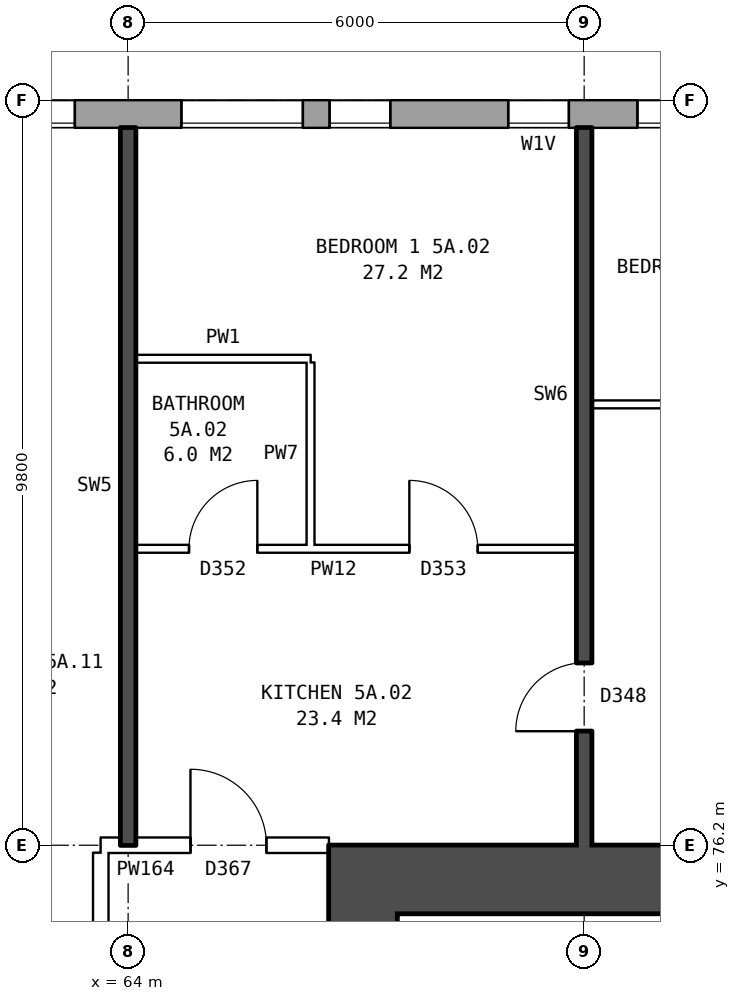
"""IFC4 building model, lengths in metres.
Left out: names, types, materials, properties, quantities, classifications, styles, units other than length and angle.
Written with IfcOpenShell. Run it as: python <this file> out.ifc"""

import sys

from ifc_helpers import new_model, si_unit, direction, frame, frame_2d, origin, place, context, subcontext, project, spatial, rectangle, extrude, element, fill, save


model = new_model("IFC4")
c1 = context("Model", 3, precision=1e-05, world=origin(), true_north=direction((0.0, 1.0)))
c2 = subcontext(c1, "Body", "Model", "MODEL_VIEW")
j1 = project(units=[si_unit("LENGTHUNIT", "METRE"), si_unit("PLANEANGLEUNIT", "RADIAN")], contexts=[c1])
p1 = place(None, origin())
s1 = spatial("IfcSite", under=j1, at=p1, CompositionType="ELEMENT")
p2 = place(p1, origin())
s2 = spatial("IfcBuilding", under=s1, at=p2, CompositionType="ELEMENT")
p3 = place(p2, frame((0.0, 0.0, 22.6)))
s3 = spatial("IfcBuildingStorey", under=s2, at=p3, CompositionType="ELEMENT", Elevation=22.6)
p4 = place(p3, frame((72.925, 85.82, 0.0), z_axis=(0.0, 0.0, 1.0), x_axis=(-1.0, 0.0, 0.0)))
e1 = element("IfcWall", 1, at=p4, inside=s3, PredefinedType="STANDARD", context=c2, shape_type="SweptSolid", body=[
    extrude(rectangle(XDim=50.101, YDim=0.36, at=frame_2d((25.05, 0.0))), origin(), (0.0, 0.0, 1.0), 2.85),
])
p5 = place(p4, frame((0.625, 0.0, 0.8)))
e2 = element("IfcOpeningElement", 2, at=p5, cuts=e1, PredefinedType="OPENING", context=c2, shape_type="SweptSolid", body=[
    extrude(rectangle(XDim=1.6, YDim=1.8, at=frame_2d((0.8, 0.9))), frame((0.0, 0.19, 0.0), z_axis=(0.0, -1.0, 0.0), x_axis=(1.0, 0.0, 0.0)), (0.0, 0.0, 1.0), 0.38),
])
p6 = place(p4, frame((3.125, 0.0, 1.7)))
e3 = element("IfcOpeningElement", 3, at=p6, cuts=e1, PredefinedType="OPENING", context=c2, shape_type="SweptSolid", body=[
    extrude(rectangle(XDim=0.8, YDim=0.9, at=frame_2d((0.4, 0.45))), frame((0.0, 0.19, 0.0), z_axis=(0.0, -1.0, 0.0), x_axis=(1.0, 0.0, 0.0)), (0.0, 0.0, 1.0), 0.38),
])
p7 = place(p4, frame((6.625, 0.0, 0.8)))
e4 = element("IfcOpeningElement", 4, at=p7, cuts=e1, PredefinedType="OPENING", context=c2, shape_type="SweptSolid", body=[
    extrude(rectangle(XDim=1.6, YDim=1.8, at=frame_2d((0.8, 0.9))), frame((0.0, 0.19, 0.0), z_axis=(0.0, -1.0, 0.0), x_axis=(1.0, 0.0, 0.0)), (0.0, 0.0, 1.0), 0.38),
])
p8 = place(p4, frame((9.625, 0.0, 0.8)))
e5 = element("IfcOpeningElement", 5, at=p8, cuts=e1, PredefinedType="OPENING", context=c2, shape_type="SweptSolid", body=[
    extrude(rectangle(XDim=1.6, YDim=1.8, at=frame_2d((0.8, 0.9))), frame((0.0, 0.19, 0.0), z_axis=(0.0, -1.0, 0.0), x_axis=(1.0, 0.0, 0.0)), (0.0, 0.0, 1.0), 0.38),
])
p9 = place(p4, frame((12.625, 0.0, 0.8)))
e6 = element("IfcOpeningElement", 6, at=p9, cuts=e1, PredefinedType="OPENING", context=c2, shape_type="SweptSolid", body=[
    extrude(rectangle(XDim=1.6, YDim=1.8, at=frame_2d((0.8, 0.9))), frame((0.0, 0.19, 0.0), z_axis=(0.0, -1.0, 0.0), x_axis=(1.0, 0.0, 0.0)), (0.0, 0.0, 1.0), 0.38),
])
p10 = place(p4, frame((15.625, 0.0, 0.8)))
e7 = element("IfcOpeningElement", 7, at=p10, cuts=e1, PredefinedType="OPENING", context=c2, shape_type="SweptSolid", body=[
    extrude(rectangle(XDim=1.6, YDim=1.8, at=frame_2d((0.8, 0.9))), frame((0.0, 0.19, 0.0), z_axis=(0.0, -1.0, 0.0), x_axis=(1.0, 0.0, 0.0)), (0.0, 0.0, 1.0), 0.38),
])
p11 = place(p4, frame((18.625, 0.0, 0.8)))
e8 = element("IfcOpeningElement", 8, at=p11, cuts=e1, PredefinedType="OPENING", context=c2, shape_type="SweptSolid", body=[
    extrude(rectangle(XDim=1.6, YDim=1.8, at=frame_2d((0.8, 0.9))), frame((0.0, 0.19, 0.0), z_axis=(0.0, -1.0, 0.0), x_axis=(1.0, 0.0, 0.0)), (0.0, 0.0, 1.0), 0.38),
])
p12 = place(p4, frame((21.625, 0.0, 0.8)))
e9 = element("IfcOpeningElement", 9, at=p12, cuts=e1, PredefinedType="OPENING", context=c2, shape_type="SweptSolid", body=[
    extrude(rectangle(XDim=1.6, YDim=1.8, at=frame_2d((0.8, 0.9))), frame((0.0, 0.19, 0.0), z_axis=(0.0, -1.0, 0.0), x_axis=(1.0, 0.0, 0.0)), (0.0, 0.0, 1.0), 0.38),
])
p13 = place(p4, frame((24.625, 0.0, 0.8)))
e10 = element("IfcOpeningElement", 10, at=p13, cuts=e1, PredefinedType="OPENING", context=c2, shape_type="SweptSolid", body=[
    extrude(rectangle(XDim=1.6, YDim=1.8, at=frame_2d((0.8, 0.9))), frame((0.0, 0.19, 0.0), z_axis=(0.0, -1.0, 0.0), x_axis=(1.0, 0.0, 0.0)), (0.0, 0.0, 1.0), 0.38),
])
p14 = place(p4, frame((27.625, 0.0, 0.8)))
e11 = element("IfcOpeningElement", 11, at=p14, cuts=e1, PredefinedType="OPENING", context=c2, shape_type="SweptSolid", body=[
    extrude(rectangle(XDim=1.6, YDim=1.8, at=frame_2d((0.8, 0.9))), frame((0.0, 0.19, 0.0), z_axis=(0.0, -1.0, 0.0), x_axis=(1.0, 0.0, 0.0)), (0.0, 0.0, 1.0), 0.38),
])
p15 = place(p4, frame((30.625, 0.0, 0.8)))
e12 = element("IfcOpeningElement", 12, at=p15, cuts=e1, PredefinedType="OPENING", context=c2, shape_type="SweptSolid", body=[
    extrude(rectangle(XDim=1.6, YDim=1.8, at=frame_2d((0.8, 0.9))), frame((0.0, 0.19, 0.0), z_axis=(0.0, -1.0, 0.0), x_axis=(1.0, 0.0, 0.0)), (0.0, 0.0, 1.0), 0.38),
])
p16 = place(p4, frame((33.625, 0.0, 0.8)))
e13 = element("IfcOpeningElement", 13, at=p16, cuts=e1, PredefinedType="OPENING", context=c2, shape_type="SweptSolid", body=[
    extrude(rectangle(XDim=1.6, YDim=1.8, at=frame_2d((0.8, 0.9))), frame((0.0, 0.19, 0.0), z_axis=(0.0, -1.0, 0.0), x_axis=(1.0, 0.0, 0.0)), (0.0, 0.0, 1.0), 0.38),
])
p17 = place(p4, frame((36.625, 0.0, 0.8)))
e14 = element("IfcOpeningElement", 14, at=p17, cuts=e1, PredefinedType="OPENING", context=c2, shape_type="SweptSolid", body=[
    extrude(rectangle(XDim=1.6, YDim=1.8, at=frame_2d((0.8, 0.9))), frame((0.0, 0.19, 0.0), z_axis=(0.0, -1.0, 0.0), x_axis=(1.0, 0.0, 0.0)), (0.0, 0.0, 1.0), 0.38),
])
p18 = place(p4, frame((39.625, 0.0, 0.8)))
e15 = element("IfcOpeningElement", 15, at=p18, cuts=e1, PredefinedType="OPENING", context=c2, shape_type="SweptSolid", body=[
    extrude(rectangle(XDim=1.6, YDim=1.8, at=frame_2d((0.8, 0.9))), frame((0.0, 0.19, 0.0), z_axis=(0.0, -1.0, 0.0), x_axis=(1.0, 0.0, 0.0)), (0.0, 0.0, 1.0), 0.38),
])
p19 = place(p4, frame((41.525, 0.0, 0.8)))
e16 = element("IfcOpeningElement", 16, at=p19, cuts=e1, PredefinedType="OPENING", context=c2, shape_type="SweptSolid", body=[
    extrude(rectangle(XDim=1.6, YDim=1.8, at=frame_2d((0.8, 0.9))), frame((0.0, 0.19, 0.0), z_axis=(0.0, -1.0, 0.0), x_axis=(1.0, 0.0, 0.0)), (0.0, 0.0, 1.0), 0.38),
])
p20 = place(p4, frame((46.525, 0.0, 1.4)))
e17 = element("IfcOpeningElement", 17, at=p20, cuts=e1, PredefinedType="OPENING", context=c2, shape_type="SweptSolid", body=[
    extrude(rectangle(XDim=1.0, YDim=1.2, at=frame_2d((0.5, 0.6))), frame((0.0, 0.19, 0.0), z_axis=(0.0, -1.0, 0.0), x_axis=(1.0, 0.0, 0.0)), (0.0, 0.0, 1.0), 0.38),
])
p21 = place(p4, frame((5.475, 0.0, 0.8)))
e18 = element("IfcOpeningElement", 18, at=p21, cuts=e1, PredefinedType="OPENING", context=c2, shape_type="SweptSolid", body=[
    extrude(rectangle(XDim=0.8, YDim=0.9, at=frame_2d((0.4, 0.45))), frame((0.0, 0.19, 0.0), z_axis=(0.0, -1.0, 0.0), x_axis=(1.0, 0.0, 0.0)), (0.0, 0.0, 1.0), 0.38),
])
p22 = place(p4, frame((43.425, 0.0, 0.8)))
e19 = element("IfcOpeningElement", 19, at=p22, cuts=e1, PredefinedType="OPENING", context=c2, shape_type="SweptSolid", body=[
    extrude(rectangle(XDim=0.6, YDim=1.2, at=frame_2d((0.3, 0.6))), frame((0.0, 0.19, 0.0), z_axis=(0.0, -1.0, 0.0), x_axis=(1.0, 0.0, 0.0)), (0.0, 0.0, 1.0), 0.38),
])
p23 = place(p4, frame((47.825, 0.0, 0.8)))
e20 = element("IfcOpeningElement", 20, at=p23, cuts=e1, PredefinedType="OPENING", context=c2, shape_type="SweptSolid", body=[
    extrude(rectangle(XDim=1.4, YDim=1.8, at=frame_2d((0.7, 0.9))), frame((0.0, 0.19, 0.0), z_axis=(0.0, -1.0, 0.0), x_axis=(1.0, 0.0, 0.0)), (0.0, 0.0, 1.0), 0.38),
])
p24 = place(p3, frame((67.09, 64.7, 0.0), z_axis=(0.0, 0.0, 1.0), x_axis=(0.0, 1.0, 0.0)))
e21 = element("IfcWall", 21, at=p24, inside=s3, PredefinedType="SHEAR", context=c2, shape_type="SweptSolid", body=[
    extrude(rectangle(XDim=10.6, YDim=0.9, at=frame_2d((5.3, 0.0))), origin(), (0.0, 0.0, 1.0), 2.85),
])
p25 = place(p24, frame((0.425, 0.0, 0.0)))
e22 = element("IfcOpeningElement", 22, at=p25, cuts=e21, PredefinedType="OPENING", context=c2, shape_type="SweptSolid", body=[
    extrude(rectangle(XDim=1.1, YDim=2.1, at=frame_2d((0.55, 1.05))), frame((0.0, 0.46, 0.0), z_axis=(0.0, -1.0, 0.0), x_axis=(1.0, 0.0, 0.0)), (0.0, 0.0, 1.0), 0.92),
])
p26 = place(p24, frame((9.0, 0.0, 0.0)))
e23 = element("IfcOpeningElement", 23, at=p26, cuts=e21, PredefinedType="OPENING", context=c2, shape_type="SweptSolid", body=[
    extrude(rectangle(XDim=1.1, YDim=2.1, at=frame_2d((0.55, 1.05))), frame((0.0, 0.46, 0.0), z_axis=(0.0, -1.0, 0.0), x_axis=(1.0, 0.0, 0.0)), (0.0, 0.0, 1.0), 0.92),
])
p27 = place(p3, frame((66.64, 75.75, 0.0), z_axis=(0.0, 0.0, 1.0), x_axis=(1.0, 0.0, 0.0)))
e24 = element("IfcWall", 24, at=p27, inside=s3, PredefinedType="SHEAR", context=c2, shape_type="SweptSolid", body=[
    extrude(rectangle(XDim=9.0, YDim=0.9, at=frame_2d((4.5, 0.0))), origin(), (0.0, 0.0, 1.0), 2.85),
])
p28 = place(p3, frame((63.64, 63.9, 0.0), z_axis=(0.0, 0.0, 1.0), x_axis=(0.0, 1.0, 0.0)))
e25 = element("IfcWall", 25, at=p28, inside=s3, PredefinedType="PARTITIONING", context=c2, shape_type="SweptSolid", body=[
    extrude(rectangle(XDim=12.2, YDim=0.2, at=frame_2d((6.1, 0.0))), origin(), (0.0, 0.0, 1.0), 2.85),
])
p29 = place(p28, frame((5.1, 0.0, 0.0)))
e26 = element("IfcOpeningElement", 26, at=p29, cuts=e25, PredefinedType="OPENING", context=c2, shape_type="SweptSolid", body=[
    extrude(rectangle(XDim=2.0, YDim=2.1, at=frame_2d((1.0, 1.05))), frame((0.0, 0.11, 0.0), z_axis=(0.0, -1.0, 0.0), x_axis=(1.0, 0.0, 0.0)), (0.0, 0.0, 1.0), 0.22),
])
p30 = place(p3, frame((63.64, 76.2, 0.0), z_axis=(0.0, 0.0, 1.0), x_axis=(1.0, 0.0, 0.0)))
e27 = element("IfcWall", 27, at=p30, inside=s3, PredefinedType="PARTITIONING", context=c2, shape_type="SweptSolid", body=[
    extrude(rectangle(XDim=3.0, YDim=0.2, at=frame_2d((1.5, 0.0))), origin(), (0.0, 0.0, 1.0), 2.85),
])
p31 = place(p30, frame((1.18, 0.0, 0.0)))
e28 = element("IfcOpeningElement", 28, at=p31, cuts=e27, PredefinedType="OPENING", context=c2, shape_type="SweptSolid", body=[
    extrude(rectangle(XDim=1.0, YDim=2.1, at=frame_2d((0.5, 1.05))), frame((0.0, 0.11, 0.0), z_axis=(0.0, -1.0, 0.0), x_axis=(1.0, 0.0, 0.0)), (0.0, 0.0, 1.0), 0.22),
])
p32 = place(p3, frame((64.1, 80.1, 0.0), z_axis=(0.0, 0.0, 1.0), x_axis=(1.0, 0.0, 0.0)))
e29 = element("IfcWall", 29, at=p32, inside=s3, PredefinedType="PARTITIONING", context=c2, shape_type="SweptSolid", body=[
    extrude(rectangle(XDim=5.8, YDim=0.1, at=frame_2d((2.9, 0.0))), origin(), (0.0, 0.0, 1.0), 2.85),
])
p33 = place(p32, frame((3.6, 0.0, 0.0)))
e30 = element("IfcOpeningElement", 30, at=p33, cuts=e29, PredefinedType="OPENING", context=c2, shape_type="SweptSolid", body=[
    extrude(rectangle(XDim=0.9, YDim=2.1, at=frame_2d((0.45, 1.05))), frame((0.0, 0.06, 0.0), z_axis=(0.0, -1.0, 0.0), x_axis=(1.0, 0.0, 0.0)), (0.0, 0.0, 1.0), 0.12),
])
p34 = place(p32, frame((0.7, 0.0, 0.0)))
e31 = element("IfcOpeningElement", 31, at=p34, cuts=e29, PredefinedType="OPENING", context=c2, shape_type="SweptSolid", body=[
    extrude(rectangle(XDim=0.9, YDim=2.1, at=frame_2d((0.45, 1.05))), frame((0.0, 0.06, 0.0), z_axis=(0.0, -1.0, 0.0), x_axis=(1.0, 0.0, 0.0)), (0.0, 0.0, 1.0), 0.12),
])
p35 = place(p3, frame((70.1, 82.0, 0.0), z_axis=(0.0, 0.0, 1.0), x_axis=(1.0, 0.0, 0.0)))
e32 = element("IfcWall", 32, at=p35, inside=s3, PredefinedType="PARTITIONING", context=c2, shape_type="SweptSolid", body=[
    extrude(rectangle(XDim=5.54, YDim=0.1, at=frame_2d((2.77, 0.0))), origin(), (0.0, 0.0, 1.0), 2.85),
])
p36 = place(p35, frame((2.32, 0.0, 0.0)))
e33 = element("IfcOpeningElement", 33, at=p36, cuts=e32, PredefinedType="OPENING", context=c2, shape_type="SweptSolid", body=[
    extrude(rectangle(XDim=0.9, YDim=2.1, at=frame_2d((0.45, 1.05))), frame((0.0, 0.06, 0.0), z_axis=(0.0, -1.0, 0.0), x_axis=(1.0, 0.0, 0.0)), (0.0, 0.0, 1.0), 0.12),
])
p37 = place(p3, frame((64.1, 82.6, 0.0), z_axis=(0.0, 0.0, 1.0), x_axis=(1.0, 0.0, 0.0)))
e34 = element("IfcWall", 34, at=p37, inside=s3, PredefinedType="PARTITIONING", context=c2, shape_type="SweptSolid", body=[
    extrude(rectangle(XDim=2.3, YDim=0.1, at=frame_2d((1.15, 0.0))), origin(), (0.0, 0.0, 1.0), 2.85),
])
p38 = place(p3, frame((64.0, 76.2, 0.0), z_axis=(0.0, 0.0, 1.0), x_axis=(0.0, 1.0, 0.0)))
e35 = element("IfcWall", 35, at=p38, inside=s3, PredefinedType="SOLIDWALL", context=c2, shape_type="SweptSolid", body=[
    extrude(rectangle(XDim=9.44, YDim=0.2, at=frame_2d((4.72, 0.0))), origin(), (0.0, 0.0, 1.0), 2.85),
])
p39 = place(p3, frame((66.4, 80.15, 0.0), z_axis=(0.0, 0.0, 1.0), x_axis=(0.0, 1.0, 0.0)))
e36 = element("IfcWall", 36, at=p39, inside=s3, PredefinedType="PARTITIONING", context=c2, shape_type="SweptSolid", body=[
    extrude(rectangle(XDim=2.4, YDim=0.1, at=frame_2d((1.2, 0.0))), origin(), (0.0, 0.0, 1.0), 2.85),
])
p40 = place(p3, frame((70.0, 76.2, 0.0), z_axis=(0.0, 0.0, 1.0), x_axis=(0.0, 1.0, 0.0)))
e37 = element("IfcWall", 37, at=p40, inside=s3, PredefinedType="SOLIDWALL", context=c2, shape_type="SweptSolid", body=[
    extrude(rectangle(XDim=9.44, YDim=0.2, at=frame_2d((4.72, 0.0))), origin(), (0.0, 0.0, 1.0), 2.85),
])
p41 = place(p40, frame((1.5, 0.0, 0.0)))
e38 = element("IfcOpeningElement", 38, at=p41, cuts=e37, PredefinedType="OPENING", context=c2, shape_type="SweptSolid", body=[
    extrude(rectangle(XDim=0.9, YDim=2.1, at=frame_2d((0.45, 1.05))), frame((0.0, 0.11, 0.0), z_axis=(0.0, -1.0, 0.0), x_axis=(1.0, 0.0, 0.0)), (0.0, 0.0, 1.0), 0.22),
])
p42 = place(p5, origin())
e39 = element("IfcWindow", 39, at=p42, inside=s3, PartitioningType="SINGLE_PANEL", PredefinedType="WINDOW", context=c2, shape_type="SweptSolid", body=[
    extrude(rectangle(XDim=1.6, YDim=1.8, at=frame_2d((0.8, 0.9))), frame((0.0, 0.15, 0.0), z_axis=(0.0, -1.0, 0.0), x_axis=(1.0, 0.0, 0.0)), (0.0, 0.0, 1.0), 0.06),
])
fill(e2, e39)
p43 = place(p6, origin())
e40 = element("IfcWindow", 40, at=p43, inside=s3, PartitioningType="SINGLE_PANEL", PredefinedType="WINDOW", context=c2, shape_type="SweptSolid", body=[
    extrude(rectangle(XDim=0.8, YDim=0.9, at=frame_2d((0.4, 0.45))), frame((0.0, 0.15, 0.0), z_axis=(0.0, -1.0, 0.0), x_axis=(1.0, 0.0, 0.0)), (0.0, 0.0, 1.0), 0.06),
])
fill(e3, e40)
p44 = place(p7, origin())
e41 = element("IfcWindow", 41, at=p44, inside=s3, PartitioningType="SINGLE_PANEL", PredefinedType="WINDOW", context=c2, shape_type="SweptSolid", body=[
    extrude(rectangle(XDim=1.6, YDim=1.8, at=frame_2d((0.8, 0.9))), frame((0.0, 0.15, 0.0), z_axis=(0.0, -1.0, 0.0), x_axis=(1.0, 0.0, 0.0)), (0.0, 0.0, 1.0), 0.06),
])
fill(e4, e41)
p45 = place(p8, origin())
e42 = element("IfcWindow", 42, at=p45, inside=s3, PartitioningType="SINGLE_PANEL", PredefinedType="WINDOW", context=c2, shape_type="SweptSolid", body=[
    extrude(rectangle(XDim=1.6, YDim=1.8, at=frame_2d((0.8, 0.9))), frame((0.0, 0.15, 0.0), z_axis=(0.0, -1.0, 0.0), x_axis=(1.0, 0.0, 0.0)), (0.0, 0.0, 1.0), 0.06),
])
fill(e5, e42)
p46 = place(p33, origin())
e43 = element("IfcDoor", 43, at=p46, inside=s3, OperationType="SINGLE_SWING_LEFT", PredefinedType="DOOR", context=c2, shape_type="SweptSolid", body=[
    extrude(rectangle(XDim=0.9, YDim=2.1, at=frame_2d((0.45, 1.05))), frame((0.0, 0.025, 0.0), z_axis=(0.0, -1.0, 0.0), x_axis=(1.0, 0.0, 0.0)), (0.0, 0.0, 1.0), 0.05),
])
fill(e30, e43)
p47 = place(p31, origin())
e44 = element("IfcDoor", 44, at=p47, inside=s3, OperationType="SINGLE_SWING_LEFT", PredefinedType="DOOR", context=c2, shape_type="SweptSolid", body=[
    extrude(rectangle(XDim=1.0, YDim=2.1, at=frame_2d((0.5, 1.05))), frame((0.0, 0.025, 0.0), z_axis=(0.0, -1.0, 0.0), x_axis=(1.0, 0.0, 0.0)), (0.0, 0.0, 1.0), 0.05),
])
fill(e28, e44)
p48 = place(p41, origin())
e45 = element("IfcDoor", 45, at=p48, inside=s3, OperationType="SINGLE_SWING_LEFT", PredefinedType="DOOR", context=c2, shape_type="SweptSolid", body=[
    extrude(rectangle(XDim=0.9, YDim=2.1, at=frame_2d((0.45, 1.05))), frame((0.0, 0.025, 0.0), z_axis=(0.0, -1.0, 0.0), x_axis=(1.0, 0.0, 0.0)), (0.0, 0.0, 1.0), 0.05),
])
fill(e38, e45)
p49 = place(p34, origin())
e46 = element("IfcDoor", 46, at=p49, inside=s3, OperationType="SINGLE_SWING_RIGHT", PredefinedType="DOOR", context=c2, shape_type="SweptSolid", body=[
    extrude(rectangle(XDim=0.9, YDim=2.1, at=frame_2d((0.45, 1.05))), frame((0.0, 0.025, 0.0), z_axis=(0.0, -1.0, 0.0), x_axis=(1.0, 0.0, 0.0)), (0.0, 0.0, 1.0), 0.05),
])
fill(e31, e46)
p50 = place(p21, origin())
e47 = element("IfcWindow", 47, at=p50, inside=s3, PartitioningType="SINGLE_PANEL", PredefinedType="WINDOW", context=c2, shape_type="SweptSolid", body=[
    extrude(rectangle(XDim=0.8, YDim=0.9, at=frame_2d((0.4, 0.45))), frame((0.0, 0.15, 0.0), z_axis=(0.0, -1.0, 0.0), x_axis=(1.0, 0.0, 0.0)), (0.0, 0.0, 1.0), 0.06),
])
fill(e18, e47)
save(model, sys.argv[1])
